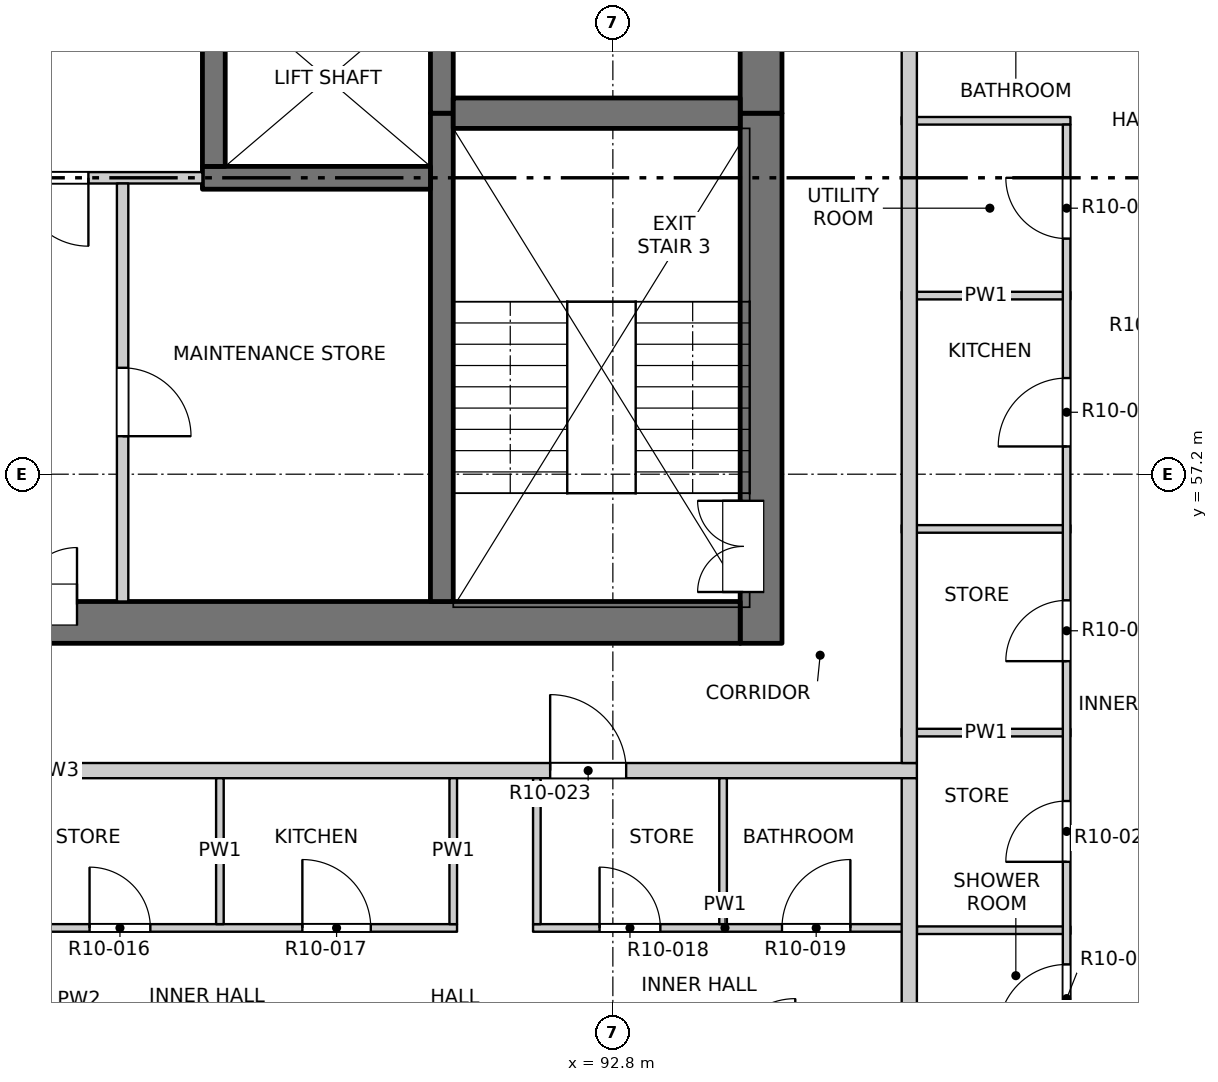
"""IFC4 building model, lengths in metres.
Left out: names, types, materials, properties, quantities, classifications, styles, units other than length and angle.
Written with IfcOpenShell. Run it as: python <this file> out.ifc"""

import sys

from ifc_helpers import new_model, si_unit, direction, frame, frame_2d, origin, place, context, subcontext, project, spatial, rectangle, extrude, element, fill, save


model = new_model("IFC4")
c1 = context("Model", 3, precision=1e-05, world=origin(), true_north=direction((0.0, 1.0)))
c2 = subcontext(c1, "Body", "Model", "MODEL_VIEW")
j1 = project(units=[si_unit("LENGTHUNIT", "METRE"), si_unit("PLANEANGLEUNIT", "RADIAN")], contexts=[c1])
p1 = place(None, origin())
s1 = spatial("IfcSite", under=j1, at=p1, CompositionType="ELEMENT")
p2 = place(p1, origin())
s2 = spatial("IfcBuilding", under=s1, at=p2, CompositionType="ELEMENT")
p3 = place(p2, frame((0.0, 0.0, 123.7)))
s3 = spatial("IfcBuildingStorey", under=s2, at=p3, CompositionType="ELEMENT", Elevation=123.7)
p4 = place(p3, frame((94.75, 54.975, -0.3), z_axis=(0.0, 0.0, 1.0), x_axis=(0.0, 1.0, 0.0)))
e1 = element("IfcWall", 1, at=p4, inside=s3, PredefinedType="SOLIDWALL", context=c2, shape_type="SweptSolid", body=[
    extrude(rectangle(XDim=6.975, YDim=0.55, at=frame_2d((3.487, 0.0))), origin(), (0.0, 0.0, 1.0), 3.45),
])
p5 = place(p4, frame((0.675, 0.0, 0.3)))
e2 = element("IfcOpeningElement", 2, at=p5, cuts=e1, PredefinedType="OPENING", context=c2, shape_type="SweptSolid", body=[
    extrude(rectangle(XDim=1.2, YDim=2.1, at=frame_2d((0.6, 1.05))), frame((0.0, 0.285, 0.0), z_axis=(0.0, -1.0, 0.0), x_axis=(1.0, 0.0, 0.0)), (0.0, 0.0, 1.0), 0.57),
])
p6 = place(p3, frame((94.75, 61.95, -0.3), z_axis=(0.0, 0.0, 1.0), x_axis=(0.0, 1.0, 0.0)))
e3 = element("IfcWall", 3, at=p6, inside=s3, PredefinedType="SOLIDWALL", context=c2, shape_type="SweptSolid", body=[
    extrude(rectangle(XDim=15.35, YDim=0.55, at=frame_2d((7.675, 0.0))), origin(), (0.0, 0.0, 1.0), 3.45),
])
p7 = place(p6, frame((0.925, 0.0, 0.3)))
e4 = element("IfcOpeningElement", 4, at=p7, cuts=e3, PredefinedType="OPENING", context=c2, shape_type="SweptSolid", body=[
    extrude(rectangle(XDim=0.9, YDim=2.1, at=frame_2d((0.45, 1.05))), frame((0.0, 0.285, 0.0), z_axis=(0.0, -1.0, 0.0), x_axis=(1.0, 0.0, 0.0)), (0.0, 0.0, 1.0), 0.57),
])
p8 = place(p6, frame((5.15, 0.0, 0.3)))
e5 = element("IfcOpeningElement", 5, at=p8, cuts=e3, PredefinedType="OPENING", context=c2, shape_type="SweptSolid", body=[
    extrude(rectangle(XDim=0.9, YDim=2.1, at=frame_2d((0.45, 1.05))), frame((0.0, 0.285, 0.0), z_axis=(0.0, -1.0, 0.0), x_axis=(1.0, 0.0, 0.0)), (0.0, 0.0, 1.0), 0.57),
])
p9 = place(p6, frame((9.65, 0.0, 0.3)))
e6 = element("IfcOpeningElement", 6, at=p9, cuts=e3, PredefinedType="OPENING", context=c2, shape_type="SweptSolid", body=[
    extrude(rectangle(XDim=0.9, YDim=2.1, at=frame_2d((0.45, 1.05))), frame((0.0, 0.285, 0.0), z_axis=(0.0, -1.0, 0.0), x_axis=(1.0, 0.0, 0.0)), (0.0, 0.0, 1.0), 0.57),
])
p10 = place(p6, frame((13.1, 0.0, 0.3)))
e7 = element("IfcOpeningElement", 7, at=p10, cuts=e3, PredefinedType="OPENING", context=c2, shape_type="SweptSolid", body=[
    extrude(rectangle(XDim=0.9, YDim=2.1, at=frame_2d((0.45, 1.05))), frame((0.0, 0.285, 0.0), z_axis=(0.0, -1.0, 0.0), x_axis=(1.0, 0.0, 0.0)), (0.0, 0.0, 1.0), 0.57),
])
p11 = place(p3, frame((75.525, 55.25, -0.3), z_axis=(0.0, 0.0, 1.0), x_axis=(1.0, 0.0, 0.0)))
e8 = element("IfcWall", 8, at=p11, inside=s3, PredefinedType="SOLIDWALL", context=c2, shape_type="SweptSolid", body=[
    extrude(rectangle(XDim=18.95, YDim=0.55, at=frame_2d((9.475, 0.0))), origin(), (0.0, 0.0, 1.0), 3.45),
])
p12 = place(p11, frame((8.725, 0.0, 0.3)))
e9 = element("IfcOpeningElement", 9, at=p12, cuts=e8, PredefinedType="OPENING", context=c2, shape_type="SweptSolid", body=[
    extrude(rectangle(XDim=1.5, YDim=2.1, at=frame_2d((0.75, 1.05))), frame((0.0, 0.285, 0.0), z_axis=(0.0, -1.0, 0.0), x_axis=(1.0, 0.0, 0.0)), (0.0, 0.0, 1.0), 0.57),
])
p13 = place(p3, frame((90.55, 55.525, -0.3), z_axis=(0.0, 0.0, 1.0), x_axis=(0.0, 1.0, 0.0)))
e10 = element("IfcWall", 10, at=p13, inside=s3, PredefinedType="SOLIDWALL", context=c2, shape_type="SweptSolid", body=[
    extrude(rectangle(XDim=6.425, YDim=0.3, at=frame_2d((3.212, 0.0))), origin(), (0.0, 0.0, 1.0), 3.45),
])
p14 = place(p3, frame((90.55, 61.95, -0.3), z_axis=(0.0, 0.0, 1.0), x_axis=(0.0, 1.0, 0.0)))
e11 = element("IfcWall", 11, at=p14, inside=s3, PredefinedType="SOLIDWALL", context=c2, shape_type="SweptSolid", body=[
    extrude(rectangle(XDim=15.35, YDim=0.3, at=frame_2d((7.675, 0.0))), origin(), (0.0, 0.0, 1.0), 3.45),
])
p15 = place(p3, frame((87.4, 61.1, -0.3), z_axis=(0.0, 0.0, 1.0), x_axis=(1.0, 0.0, 0.0)))
e12 = element("IfcWall", 12, at=p15, inside=s3, PredefinedType="SOLIDWALL", context=c2, shape_type="SweptSolid", body=[
    extrude(rectangle(XDim=3.0, YDim=0.3, at=frame_2d((1.5, 0.0))), origin(), (0.0, 0.0, 1.0), 3.45),
])
p16 = place(p3, frame((87.55, 61.25, -0.3), z_axis=(0.0, 0.0, 1.0), x_axis=(0.0, 1.0, 0.0)))
e13 = element("IfcWall", 13, at=p16, inside=s3, PredefinedType="SOLIDWALL", context=c2, shape_type="SweptSolid", body=[
    extrude(rectangle(XDim=2.3, YDim=0.3, at=frame_2d((1.15, 0.0))), origin(), (0.0, 0.0, 1.0), 3.45),
])
p17 = place(p3, frame((90.7, 61.95, -0.3), z_axis=(0.0, 0.0, 1.0), x_axis=(1.0, 0.0, 0.0)))
e14 = element("IfcWall", 14, at=p17, inside=s3, PredefinedType="SOLIDWALL", context=c2, shape_type="SweptSolid", body=[
    extrude(rectangle(XDim=3.775, YDim=0.4, at=frame_2d((1.888, 0.0))), origin(), (0.0, 0.0, 1.0), 3.45),
])
p18 = place(p3, frame((96.8, 51.2, 0.0), z_axis=(0.0, 0.0, 1.0), x_axis=(1.0, 0.0, 0.0)))
e15 = element("IfcWall", 15, at=p18, inside=s3, PredefinedType="PARTITIONING", context=c2, shape_type="SweptSolid", body=[
    extrude(rectangle(XDim=2.02, YDim=0.1, at=frame_2d((1.01, 0.0))), origin(), (0.0, 0.0, 1.0), 3.15),
])
p19 = place(p3, frame((79.15, 51.23, 0.0), z_axis=(0.0, 0.0, 1.0), x_axis=(1.0, 0.0, 0.0)))
e16 = element("IfcWall", 16, at=p19, inside=s3, PredefinedType="PARTITIONING", context=c2, shape_type="SweptSolid", body=[
    extrude(rectangle(XDim=11.6, YDim=0.1, at=frame_2d((5.8, 0.0))), origin(), (0.0, 0.0, 1.0), 3.15),
])
p20 = place(p19, frame((0.815, 0.0, 0.0)))
e17 = element("IfcOpeningElement", 17, at=p20, cuts=e16, PredefinedType="OPENING", context=c2, shape_type="SweptSolid", body=[
    extrude(rectangle(XDim=0.9, YDim=2.1, at=frame_2d((0.45, 1.05))), frame((0.0, 0.06, 0.0), z_axis=(0.0, -1.0, 0.0), x_axis=(1.0, 0.0, 0.0)), (0.0, 0.0, 1.0), 0.12),
])
p21 = place(p19, frame((3.715, 0.0, 0.0)))
e18 = element("IfcOpeningElement", 18, at=p21, cuts=e16, PredefinedType="OPENING", context=c2, shape_type="SweptSolid", body=[
    extrude(rectangle(XDim=0.9, YDim=2.1, at=frame_2d((0.45, 1.05))), frame((0.0, 0.06, 0.0), z_axis=(0.0, -1.0, 0.0), x_axis=(1.0, 0.0, 0.0)), (0.0, 0.0, 1.0), 0.12),
])
p22 = place(p19, frame((6.765, 0.0, 0.0)))
e19 = element("IfcOpeningElement", 19, at=p22, cuts=e16, PredefinedType="OPENING", context=c2, shape_type="SweptSolid", body=[
    extrude(rectangle(XDim=0.8, YDim=2.1, at=frame_2d((0.4, 1.05))), frame((0.0, 0.06, 0.0), z_axis=(0.0, -1.0, 0.0), x_axis=(1.0, 0.0, 0.0)), (0.0, 0.0, 1.0), 0.12),
])
p23 = place(p19, frame((9.565, 0.0, 0.0)))
e20 = element("IfcOpeningElement", 20, at=p23, cuts=e16, PredefinedType="OPENING", context=c2, shape_type="SweptSolid", body=[
    extrude(rectangle(XDim=0.9, YDim=2.1, at=frame_2d((0.45, 1.05))), frame((0.0, 0.06, 0.0), z_axis=(0.0, -1.0, 0.0), x_axis=(1.0, 0.0, 0.0)), (0.0, 0.0, 1.0), 0.12),
])
p24 = place(p3, frame((91.75, 51.23, 0.0), z_axis=(0.0, 0.0, 1.0), x_axis=(1.0, 0.0, 0.0)))
e21 = element("IfcWall", 21, at=p24, inside=s3, PredefinedType="PARTITIONING", context=c2, shape_type="SweptSolid", body=[
    extrude(rectangle(XDim=5.05, YDim=0.1, at=frame_2d((2.525, 0.0))), origin(), (0.0, 0.0, 1.0), 3.15),
])
p25 = place(p24, frame((0.875, 0.0, 0.0)))
e22 = element("IfcOpeningElement", 22, at=p25, cuts=e21, PredefinedType="OPENING", context=c2, shape_type="SweptSolid", body=[
    extrude(rectangle(XDim=0.8, YDim=2.1, at=frame_2d((0.4, 1.05))), frame((0.0, 0.06, 0.0), z_axis=(0.0, -1.0, 0.0), x_axis=(1.0, 0.0, 0.0)), (0.0, 0.0, 1.0), 0.12),
])
p26 = place(p24, frame((3.275, 0.0, 0.0)))
e23 = element("IfcOpeningElement", 23, at=p26, cuts=e21, PredefinedType="OPENING", context=c2, shape_type="SweptSolid", body=[
    extrude(rectangle(XDim=0.9, YDim=2.1, at=frame_2d((0.45, 1.05))), frame((0.0, 0.06, 0.0), z_axis=(0.0, -1.0, 0.0), x_axis=(1.0, 0.0, 0.0)), (0.0, 0.0, 1.0), 0.12),
])
p27 = place(p3, frame((73.2, 53.3, 0.0), z_axis=(0.0, 0.0, 1.0), x_axis=(1.0, 0.0, 0.0)))
e24 = element("IfcWall", 24, at=p27, inside=s3, PredefinedType="PARTITIONING", context=c2, shape_type="SweptSolid", body=[
    extrude(rectangle(XDim=23.6, YDim=0.2, at=frame_2d((11.8, 0.0))), origin(), (0.0, 0.0, 1.0), 3.15),
])
p28 = place(p27, frame((6.175, 0.0, 0.0)))
e25 = element("IfcOpeningElement", 25, at=p28, cuts=e24, PredefinedType="OPENING", context=c2, shape_type="SweptSolid", body=[
    extrude(rectangle(XDim=1.0, YDim=2.1, at=frame_2d((0.5, 1.05))), frame((0.0, 0.11, 0.0), z_axis=(0.0, -1.0, 0.0), x_axis=(1.0, 0.0, 0.0)), (0.0, 0.0, 1.0), 0.22),
])
p29 = place(p27, frame((18.775, 0.0, 0.0)))
e26 = element("IfcOpeningElement", 26, at=p29, cuts=e24, PredefinedType="OPENING", context=c2, shape_type="SweptSolid", body=[
    extrude(rectangle(XDim=1.0, YDim=2.1, at=frame_2d((0.5, 1.05))), frame((0.0, 0.11, 0.0), z_axis=(0.0, -1.0, 0.0), x_axis=(1.0, 0.0, 0.0)), (0.0, 0.0, 1.0), 0.22),
])
for number, where, z_axis, x_axis in (
    (27, (96.6, 53.8, 0.0), (0.0, 0.0, 1.0), (1.0, 0.0, 0.0)),
    (28, (96.6, 56.48, 0.0), (0.0, 0.0, 1.0), (1.0, 0.0, 0.0)),
    (29, (96.6, 59.55, 0.0), (0.0, 0.0, 1.0), (1.0, 0.0, 0.0)),
):
    element("IfcWall", number, at=place(p3, frame(where, z_axis=z_axis, x_axis=x_axis)), inside=s3, PredefinedType="PARTITIONING", context=c2, shape_type="SweptSolid", body=[
        extrude(rectangle(XDim=2.22, YDim=0.1, at=frame_2d((1.11, 0.0))), origin(), (0.0, 0.0, 1.0), 3.15),
    ])
p30 = place(p3, frame((82.6, 61.1, 0.0), z_axis=(0.0, 0.0, 1.0), x_axis=(1.0, 0.0, 0.0)))
e30 = element("IfcWall", 30, at=p30, inside=s3, PredefinedType="PARTITIONING", context=c2, shape_type="SweptSolid", body=[
    extrude(rectangle(XDim=4.8, YDim=0.15, at=frame_2d((2.4, 0.0))), origin(), (0.0, 0.0, 1.0), 3.15),
])
p31 = place(p30, frame((1.5, 0.0, 0.0)))
e31 = element("IfcOpeningElement", 31, at=p31, cuts=e30, PredefinedType="OPENING", context=c2, shape_type="SweptSolid", body=[
    extrude(rectangle(XDim=1.8, YDim=2.1, at=frame_2d((0.9, 1.05))), frame((0.0, 0.085, 0.0), z_axis=(0.0, -1.0, 0.0), x_axis=(1.0, 0.0, 0.0)), (0.0, 0.0, 1.0), 0.17),
])
p32 = place(p3, frame((96.6, 61.85, 0.0), z_axis=(0.0, 0.0, 1.0), x_axis=(1.0, 0.0, 0.0)))
e32 = element("IfcWall", 32, at=p32, inside=s3, PredefinedType="PARTITIONING", context=c2, shape_type="SweptSolid", body=[
    extrude(rectangle(XDim=2.22, YDim=0.1, at=frame_2d((1.11, 0.0))), origin(), (0.0, 0.0, 1.0), 3.15),
])
p33 = place(p3, frame((86.35, 55.525, 0.0), z_axis=(0.0, 0.0, 1.0), x_axis=(0.0, 1.0, 0.0)))
e33 = element("IfcWall", 33, at=p33, inside=s3, PredefinedType="PARTITIONING", context=c2, shape_type="SweptSolid", body=[
    extrude(rectangle(XDim=5.5, YDim=0.15, at=frame_2d((2.75, 0.0))), origin(), (0.0, 0.0, 1.0), 3.15),
])
p34 = place(p33, frame((2.175, 0.0, 0.0)))
e34 = element("IfcOpeningElement", 34, at=p34, cuts=e33, PredefinedType="OPENING", context=c2, shape_type="SweptSolid", body=[
    extrude(rectangle(XDim=0.9, YDim=2.1, at=frame_2d((0.45, 1.05))), frame((0.0, 0.085, 0.0), z_axis=(0.0, -1.0, 0.0), x_axis=(1.0, 0.0, 0.0)), (0.0, 0.0, 1.0), 0.17),
])
for number, where, z_axis, x_axis in (
    (35, (87.63, 51.28, 0.0), (0.0, 0.0, 1.0), (0.0, 1.0, 0.0)),
    (36, (90.7, 51.28, 0.0), (0.0, 0.0, 1.0), (0.0, 1.0, 0.0)),
    (37, (91.8, 51.28, 0.0), (0.0, 0.0, 1.0), (0.0, 1.0, 0.0)),
    (38, (94.25, 51.28, 0.0), (0.0, 0.0, 1.0), (0.0, 1.0, 0.0)),
):
    element("IfcWall", number, at=place(p3, frame(where, z_axis=z_axis, x_axis=x_axis)), inside=s3, PredefinedType="PARTITIONING", context=c2, shape_type="SweptSolid", body=[
        extrude(rectangle(XDim=1.92, YDim=0.1, at=frame_2d((0.96, 0.0))), origin(), (0.0, 0.0, 1.0), 3.15),
    ])
p35 = place(p3, frame((96.7, 45.8, 0.0), z_axis=(0.0, 0.0, 1.0), x_axis=(0.0, 1.0, 0.0)))
e39 = element("IfcWall", 39, at=p35, inside=s3, PredefinedType="PARTITIONING", context=c2, shape_type="SweptSolid", body=[
    extrude(rectangle(XDim=7.4, YDim=0.2, at=frame_2d((3.7, 0.0))), origin(), (0.0, 0.0, 1.0), 3.15),
])
p36 = place(p3, frame((96.7, 53.4, 0.0), z_axis=(0.0, 0.0, 1.0), x_axis=(0.0, 1.0, 0.0)))
e40 = element("IfcWall", 40, at=p36, inside=s3, PredefinedType="PARTITIONING", context=c2, shape_type="SweptSolid", body=[
    extrude(rectangle(XDim=30.8, YDim=0.2, at=frame_2d((15.4, 0.0))), origin(), (0.0, 0.0, 1.0), 3.15),
])
p37 = place(p36, frame((9.725, 0.0, 0.0)))
e41 = element("IfcOpeningElement", 41, at=p37, cuts=e40, PredefinedType="OPENING", context=c2, shape_type="SweptSolid", body=[
    extrude(rectangle(XDim=1.0, YDim=2.1, at=frame_2d((0.5, 1.05))), frame((0.0, 0.11, 0.0), z_axis=(0.0, -1.0, 0.0), x_axis=(1.0, 0.0, 0.0)), (0.0, 0.0, 1.0), 0.22),
])
p38 = place(p36, frame((14.775, 0.0, 0.0)))
e42 = element("IfcOpeningElement", 42, at=p38, cuts=e40, PredefinedType="OPENING", context=c2, shape_type="SweptSolid", body=[
    extrude(rectangle(XDim=1.0, YDim=2.1, at=frame_2d((0.5, 1.05))), frame((0.0, 0.11, 0.0), z_axis=(0.0, -1.0, 0.0), x_axis=(1.0, 0.0, 0.0)), (0.0, 0.0, 1.0), 0.22),
])
p39 = place(p3, frame((98.77, 49.45, 0.0), z_axis=(0.0, 0.0, 1.0), x_axis=(0.0, 1.0, 0.0)))
e43 = element("IfcWall", 43, at=p39, inside=s3, PredefinedType="PARTITIONING", context=c2, shape_type="SweptSolid", body=[
    extrude(rectangle(XDim=12.35, YDim=0.1, at=frame_2d((6.175, 0.0))), origin(), (0.0, 0.0, 1.0), 3.15),
])
p40 = place(p39, frame((0.4, 0.0, 0.0)))
e44 = element("IfcOpeningElement", 44, at=p40, cuts=e43, PredefinedType="OPENING", context=c2, shape_type="SweptSolid", body=[
    extrude(rectangle(XDim=0.9, YDim=2.1, at=frame_2d((0.45, 1.05))), frame((0.0, 0.06, 0.0), z_axis=(0.0, -1.0, 0.0), x_axis=(1.0, 0.0, 0.0)), (0.0, 0.0, 1.0), 0.12),
])
p41 = place(p39, frame((2.65, 0.0, 0.0)))
e45 = element("IfcOpeningElement", 45, at=p41, cuts=e43, PredefinedType="OPENING", context=c2, shape_type="SweptSolid", body=[
    extrude(rectangle(XDim=0.8, YDim=2.1, at=frame_2d((0.4, 1.05))), frame((0.0, 0.06, 0.0), z_axis=(0.0, -1.0, 0.0), x_axis=(1.0, 0.0, 0.0)), (0.0, 0.0, 1.0), 0.12),
])
p42 = place(p39, frame((5.29, 0.0, 0.0)))
e46 = element("IfcOpeningElement", 46, at=p42, cuts=e43, PredefinedType="OPENING", context=c2, shape_type="SweptSolid", body=[
    extrude(rectangle(XDim=0.8, YDim=2.1, at=frame_2d((0.4, 1.05))), frame((0.0, 0.06, 0.0), z_axis=(0.0, -1.0, 0.0), x_axis=(1.0, 0.0, 0.0)), (0.0, 0.0, 1.0), 0.12),
])
p43 = place(p39, frame((8.115, 0.0, 0.0)))
e47 = element("IfcOpeningElement", 47, at=p43, cuts=e43, PredefinedType="OPENING", context=c2, shape_type="SweptSolid", body=[
    extrude(rectangle(XDim=0.9, YDim=2.1, at=frame_2d((0.45, 1.05))), frame((0.0, 0.06, 0.0), z_axis=(0.0, -1.0, 0.0), x_axis=(1.0, 0.0, 0.0)), (0.0, 0.0, 1.0), 0.12),
])
p44 = place(p39, frame((10.85, 0.0, 0.0)))
e48 = element("IfcOpeningElement", 48, at=p44, cuts=e43, PredefinedType="OPENING", context=c2, shape_type="SweptSolid", body=[
    extrude(rectangle(XDim=0.8, YDim=2.1, at=frame_2d((0.4, 1.05))), frame((0.0, 0.06, 0.0), z_axis=(0.0, -1.0, 0.0), x_axis=(1.0, 0.0, 0.0)), (0.0, 0.0, 1.0), 0.12),
])
p45 = place(p40, origin())
e49 = element("IfcDoor", 49, at=p45, inside=s3, OperationType="SINGLE_SWING_LEFT", PredefinedType="DOOR", context=c2, shape_type="SweptSolid", body=[
    extrude(rectangle(XDim=0.9, YDim=2.1, at=frame_2d((0.45, 1.05))), frame((0.0, 0.025, 0.0), z_axis=(0.0, -1.0, 0.0), x_axis=(1.0, 0.0, 0.0)), (0.0, 0.0, 1.0), 0.05),
])
fill(e44, e49)
p46 = place(p22, origin())
e50 = element("IfcDoor", 50, at=p46, inside=s3, OperationType="SINGLE_SWING_LEFT", PredefinedType="DOOR", context=c2, shape_type="SweptSolid", body=[
    extrude(rectangle(XDim=0.8, YDim=2.1, at=frame_2d((0.4, 1.05))), frame((0.0, 0.025, 0.0), z_axis=(0.0, -1.0, 0.0), x_axis=(1.0, 0.0, 0.0)), (0.0, 0.0, 1.0), 0.05),
])
fill(e19, e50)
p47 = place(p23, origin())
e51 = element("IfcDoor", 51, at=p47, inside=s3, OperationType="SINGLE_SWING_LEFT", PredefinedType="DOOR", context=c2, shape_type="SweptSolid", body=[
    extrude(rectangle(XDim=0.9, YDim=2.1, at=frame_2d((0.45, 1.05))), frame((0.0, 0.025, 0.0), z_axis=(0.0, -1.0, 0.0), x_axis=(1.0, 0.0, 0.0)), (0.0, 0.0, 1.0), 0.05),
])
fill(e20, e51)
p48 = place(p25, origin())
e52 = element("IfcDoor", 52, at=p48, inside=s3, OperationType="SINGLE_SWING_LEFT", PredefinedType="DOOR", context=c2, shape_type="SweptSolid", body=[
    extrude(rectangle(XDim=0.8, YDim=2.1, at=frame_2d((0.4, 1.05))), frame((0.0, 0.025, 0.0), z_axis=(0.0, -1.0, 0.0), x_axis=(1.0, 0.0, 0.0)), (0.0, 0.0, 1.0), 0.05),
])
fill(e22, e52)
p49 = place(p26, origin())
e53 = element("IfcDoor", 53, at=p49, inside=s3, OperationType="SINGLE_SWING_RIGHT", PredefinedType="DOOR", context=c2, shape_type="SweptSolid", body=[
    extrude(rectangle(XDim=0.9, YDim=2.1, at=frame_2d((0.45, 1.05))), frame((0.0, 0.025, 0.0), z_axis=(0.0, -1.0, 0.0), x_axis=(1.0, 0.0, 0.0)), (0.0, 0.0, 1.0), 0.05),
])
fill(e23, e53)
p50 = place(p41, origin())
e54 = element("IfcDoor", 54, at=p50, inside=s3, OperationType="SINGLE_SWING_LEFT", PredefinedType="DOOR", context=c2, shape_type="SweptSolid", body=[
    extrude(rectangle(XDim=0.8, YDim=2.1, at=frame_2d((0.4, 1.05))), frame((0.0, 0.025, 0.0), z_axis=(0.0, -1.0, 0.0), x_axis=(1.0, 0.0, 0.0)), (0.0, 0.0, 1.0), 0.05),
])
fill(e45, e54)
p51 = place(p29, origin())
e55 = element("IfcDoor", 55, at=p51, inside=s3, OperationType="SINGLE_SWING_LEFT", PredefinedType="DOOR", context=c2, shape_type="SweptSolid", body=[
    extrude(rectangle(XDim=1.0, YDim=2.1, at=frame_2d((0.5, 1.05))), frame((0.0, 0.025, 0.0), z_axis=(0.0, -1.0, 0.0), x_axis=(1.0, 0.0, 0.0)), (0.0, 0.0, 1.0), 0.05),
])
fill(e26, e55)
p52 = place(p42, origin())
e56 = element("IfcDoor", 56, at=p52, inside=s3, OperationType="SINGLE_SWING_LEFT", PredefinedType="DOOR", context=c2, shape_type="SweptSolid", body=[
    extrude(rectangle(XDim=0.8, YDim=2.1, at=frame_2d((0.4, 1.05))), frame((0.0, 0.025, 0.0), z_axis=(0.0, -1.0, 0.0), x_axis=(1.0, 0.0, 0.0)), (0.0, 0.0, 1.0), 0.05),
])
fill(e46, e56)
p53 = place(p12, origin())
e57 = element("IfcDoor", 57, at=p53, inside=s3, OperationType="DOUBLE_DOOR_SINGLE_SWING", PredefinedType="DOOR", context=c2, shape_type="SweptSolid", body=[
    extrude(rectangle(XDim=1.5, YDim=2.1, at=frame_2d((0.75, 1.05))), frame((0.0, 0.26, 0.0), z_axis=(0.0, -1.0, 0.0), x_axis=(1.0, 0.0, 0.0)), (0.0, 0.0, 1.0), 0.05),
])
fill(e9, e57)
p54 = place(p5, origin())
e58 = element("IfcDoor", 58, at=p54, inside=s3, OperationType="DOUBLE_DOOR_SINGLE_SWING", PredefinedType="DOOR", context=c2, shape_type="SweptSolid", body=[
    extrude(rectangle(XDim=1.2, YDim=2.1, at=frame_2d((0.6, 1.05))), frame((0.0, 0.26, 0.0), z_axis=(0.0, -1.0, 0.0), x_axis=(1.0, 0.0, 0.0)), (0.0, 0.0, 1.0), 0.05),
])
fill(e2, e58)
p55 = place(p43, origin())
e59 = element("IfcDoor", 59, at=p55, inside=s3, OperationType="SINGLE_SWING_LEFT", PredefinedType="DOOR", context=c2, shape_type="SweptSolid", body=[
    extrude(rectangle(XDim=0.9, YDim=2.1, at=frame_2d((0.45, 1.05))), frame((0.0, 0.025, 0.0), z_axis=(0.0, -1.0, 0.0), x_axis=(1.0, 0.0, 0.0)), (0.0, 0.0, 1.0), 0.05),
])
fill(e47, e59)
p56 = place(p34, origin())
e60 = element("IfcDoor", 60, at=p56, inside=s3, OperationType="SINGLE_SWING_RIGHT", PredefinedType="DOOR", context=c2, shape_type="SweptSolid", body=[
    extrude(rectangle(XDim=0.9, YDim=2.1, at=frame_2d((0.45, 1.05))), frame((0.0, 0.025, 0.0), z_axis=(0.0, -1.0, 0.0), x_axis=(1.0, 0.0, 0.0)), (0.0, 0.0, 1.0), 0.05),
])
fill(e34, e60)
p57 = place(p44, origin())
e61 = element("IfcDoor", 61, at=p57, inside=s3, OperationType="SINGLE_SWING_RIGHT", PredefinedType="DOOR", context=c2, shape_type="SweptSolid", body=[
    extrude(rectangle(XDim=0.8, YDim=2.1, at=frame_2d((0.4, 1.05))), frame((0.0, 0.025, 0.0), z_axis=(0.0, -1.0, 0.0), x_axis=(1.0, 0.0, 0.0)), (0.0, 0.0, 1.0), 0.05),
])
fill(e48, e61)
p58 = place(p31, origin())
e62 = element("IfcDoor", 62, at=p58, inside=s3, OperationType="DOUBLE_DOOR_SINGLE_SWING", PredefinedType="DOOR", context=c2, shape_type="SweptSolid", body=[
    extrude(rectangle(XDim=1.8, YDim=2.1, at=frame_2d((0.9, 1.05))), frame((0.0, 0.025, 0.0), z_axis=(0.0, -1.0, 0.0), x_axis=(1.0, 0.0, 0.0)), (0.0, 0.0, 1.0), 0.05),
])
fill(e31, e62)
save(model, sys.argv[1])
